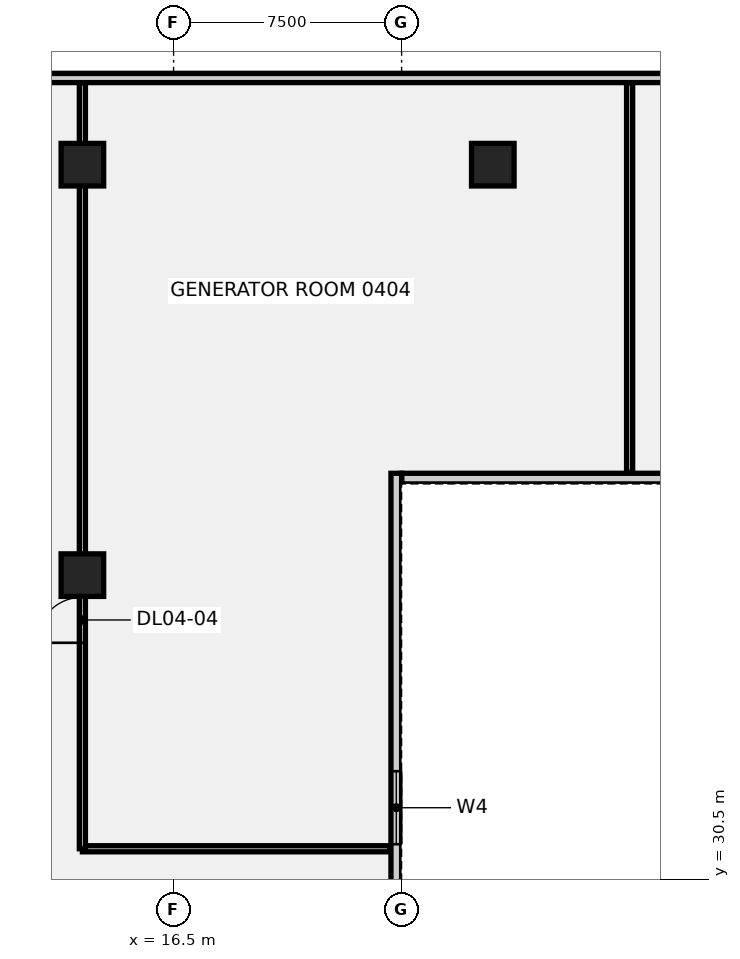
"""IFC4 building model, lengths in metres.
Left out: names, types, materials, properties, quantities, classifications, styles, units other than length and angle.
Written with IfcOpenShell. Run it as: python <this file> out.ifc"""

import sys

from ifc_helpers import new_model, si_unit, direction, frame, frame_2d, origin, origin_2d, place, context, subcontext, project, spatial, rectangle, extrude, element, fill, save


model = new_model("IFC4")
c1 = context("Model", 3, precision=1e-05, world=origin(), true_north=direction((0.0, 1.0)))
c2 = subcontext(c1, "Body", "Model", "MODEL_VIEW")
j1 = project(units=[si_unit("LENGTHUNIT", "METRE"), si_unit("PLANEANGLEUNIT", "RADIAN")], contexts=[c1])
p1 = place(None, origin())
s1 = spatial("IfcSite", under=j1, at=p1, CompositionType="ELEMENT")
p2 = place(p1, origin())
s2 = spatial("IfcBuilding", under=s1, at=p2, CompositionType="ELEMENT")
p3 = place(p2, frame((0.0, 0.0, 25.0)))
s3 = spatial("IfcBuildingStorey", under=s2, at=p3, CompositionType="ELEMENT", Elevation=25.0)
for number, where, z_axis, x_axis in (
    (1, (13.5, 40.5, -0.45), (0.0, 0.0, 1.0), (1.0, 0.0, 0.0)),
    (2, (13.5, 54.0, -0.45), (0.0, 0.0, 1.0), (1.0, 0.0, 0.0)),
    (3, (27.0, 54.0, -0.45), (0.0, 0.0, 1.0), (1.0, 0.0, 0.0)),
):
    element("IfcColumn", number, at=place(p3, frame(where, z_axis=z_axis, x_axis=x_axis)), inside=s3, PredefinedType="COLUMN", context=c2, shape_type="SweptSolid", body=[
        extrude(rectangle(XDim=1.4, YDim=1.4, at=origin_2d()), origin(), (0.0, 0.0, 1.0), 4.35),
    ])
p4 = place(p3, frame((13.5, 31.5, 0.0), z_axis=(0.0, 0.0, 1.0), x_axis=(1.0, 0.0, 0.0)))
e4 = element("IfcWall", 4, at=p4, inside=s3, PredefinedType="PARTITIONING", context=c2, shape_type="SweptSolid", body=[
    extrude(rectangle(XDim=10.12, YDim=0.2, at=frame_2d((5.06, 0.0))), origin(), (0.0, 0.0, 1.0), 3.9),
])
p5 = place(p3, frame((13.5, 31.5, 0.0), z_axis=(0.0, 0.0, 1.0), x_axis=(0.0, 1.0, 0.0)))
e5 = element("IfcWall", 5, at=p5, inside=s3, PredefinedType="PARTITIONING", context=c2, shape_type="SweptSolid", body=[
    extrude(rectangle(XDim=25.199, YDim=0.2, at=frame_2d((12.6, 0.0))), origin(), (0.0, 0.0, 1.0), 3.9),
])
p6 = place(p5, frame((6.775, 0.0, 0.0)))
e6 = element("IfcOpeningElement", 6, at=p6, cuts=e5, PredefinedType="OPENING", context=c2, shape_type="SweptSolid", body=[
    extrude(rectangle(XDim=1.5, YDim=2.1, at=frame_2d((0.75, 1.05))), frame((0.0, 0.11, 0.0), z_axis=(0.0, -1.0, 0.0), x_axis=(1.0, 0.0, 0.0)), (0.0, 0.0, 1.0), 0.22),
])
p7 = place(p3, frame((31.5, 43.88, 0.0), z_axis=(0.0, 0.0, 1.0), x_axis=(0.0, 1.0, 0.0)))
e7 = element("IfcWall", 7, at=p7, inside=s3, PredefinedType="PARTITIONING", context=c2, shape_type="SweptSolid", body=[
    extrude(rectangle(XDim=12.819, YDim=0.2, at=frame_2d((6.41, 0.0))), origin(), (0.0, 0.0, 1.0), 3.9),
])
p8 = place(p3, frame((55.988, 56.85, 0.0), z_axis=(0.0, 0.0, 1.0), x_axis=(-1.0, 0.0, 0.0)))
e8 = element("IfcWall", 8, at=p8, inside=s3, PredefinedType="SOLIDWALL", context=c2, shape_type="SweptSolid", body=[
    extrude(rectangle(XDim=111.977, YDim=0.3, at=frame_2d((55.988, 0.0))), origin(), (0.0, 0.0, 1.0), 3.9),
])
p9 = place(p8, frame((12.488, 0.0, 1.4)))
e9 = element("IfcOpeningElement", 9, at=p9, cuts=e8, PredefinedType="OPENING", context=c2, shape_type="SweptSolid", body=[
    extrude(rectangle(XDim=6.0, YDim=2.2, at=frame_2d((3.0, 1.1))), frame((0.0, 0.16, 0.0), z_axis=(0.0, -1.0, 0.0), x_axis=(1.0, 0.0, 0.0)), (0.0, 0.0, 1.0), 0.32),
])
p10 = place(p3, frame((24.0, 43.675, 0.0), z_axis=(0.0, 0.0, 1.0), x_axis=(1.0, 0.0, 0.0)))
e10 = element("IfcWall", 10, at=p10, inside=s3, PredefinedType="SOLIDWALL", context=c2, shape_type="SweptSolid", body=[
    extrude(rectangle(XDim=18.0, YDim=0.35, at=frame_2d((9.0, 0.0))), origin(), (0.0, 0.0, 1.0), 3.9),
])
p11 = place(p10, frame((14.55, 0.0, 1.0)))
e11 = element("IfcOpeningElement", 11, at=p11, cuts=e10, PredefinedType="OPENING", context=c2, shape_type="SweptSolid", body=[
    extrude(rectangle(XDim=2.4, YDim=1.8, at=frame_2d((1.2, 0.9))), frame((0.0, 0.185, 0.0), z_axis=(0.0, -1.0, 0.0), x_axis=(1.0, 0.0, 0.0)), (0.0, 0.0, 1.0), 0.37),
])
p12 = place(p3, frame((23.825, 16.45, 0.0), z_axis=(0.0, 0.0, 1.0), x_axis=(0.0, 1.0, 0.0)))
e12 = element("IfcWall", 12, at=p12, inside=s3, PredefinedType="SOLIDWALL", context=c2, shape_type="SweptSolid", body=[
    extrude(rectangle(XDim=27.4, YDim=0.35, at=frame_2d((13.7, 0.0))), origin(), (0.0, 0.0, 1.0), 3.9),
])
p13 = place(p12, frame((15.2, 0.0, 1.0)))
e13 = element("IfcOpeningElement", 13, at=p13, cuts=e12, PredefinedType="OPENING", context=c2, shape_type="SweptSolid", body=[
    extrude(rectangle(XDim=2.4, YDim=1.8, at=frame_2d((1.2, 0.9))), frame((0.0, 0.185, 0.0), z_axis=(0.0, -1.0, 0.0), x_axis=(1.0, 0.0, 0.0)), (0.0, 0.0, 1.0), 0.37),
])
p14 = place(p6, origin())
e14 = element("IfcDoor", 14, at=p14, inside=s3, OperationType="SINGLE_SWING_RIGHT", PredefinedType="DOOR", context=c2, shape_type="SweptSolid", body=[
    extrude(rectangle(XDim=1.5, YDim=2.1, at=frame_2d((0.75, 1.05))), frame((0.0, 0.025, 0.0), z_axis=(0.0, -1.0, 0.0), x_axis=(1.0, 0.0, 0.0)), (0.0, 0.0, 1.0), 0.05),
])
fill(e6, e14)
p15 = place(p13, origin())
e15 = element("IfcWindow", 15, at=p15, inside=s3, PartitioningType="SINGLE_PANEL", PredefinedType="WINDOW", context=c2, shape_type="SweptSolid", body=[
    extrude(rectangle(XDim=2.4, YDim=1.8, at=frame_2d((1.2, 0.9))), frame((0.0, 0.03, 0.0), z_axis=(0.0, -1.0, 0.0), x_axis=(1.0, 0.0, 0.0)), (0.0, 0.0, 1.0), 0.06),
])
fill(e13, e15)
save(model, sys.argv[1])
